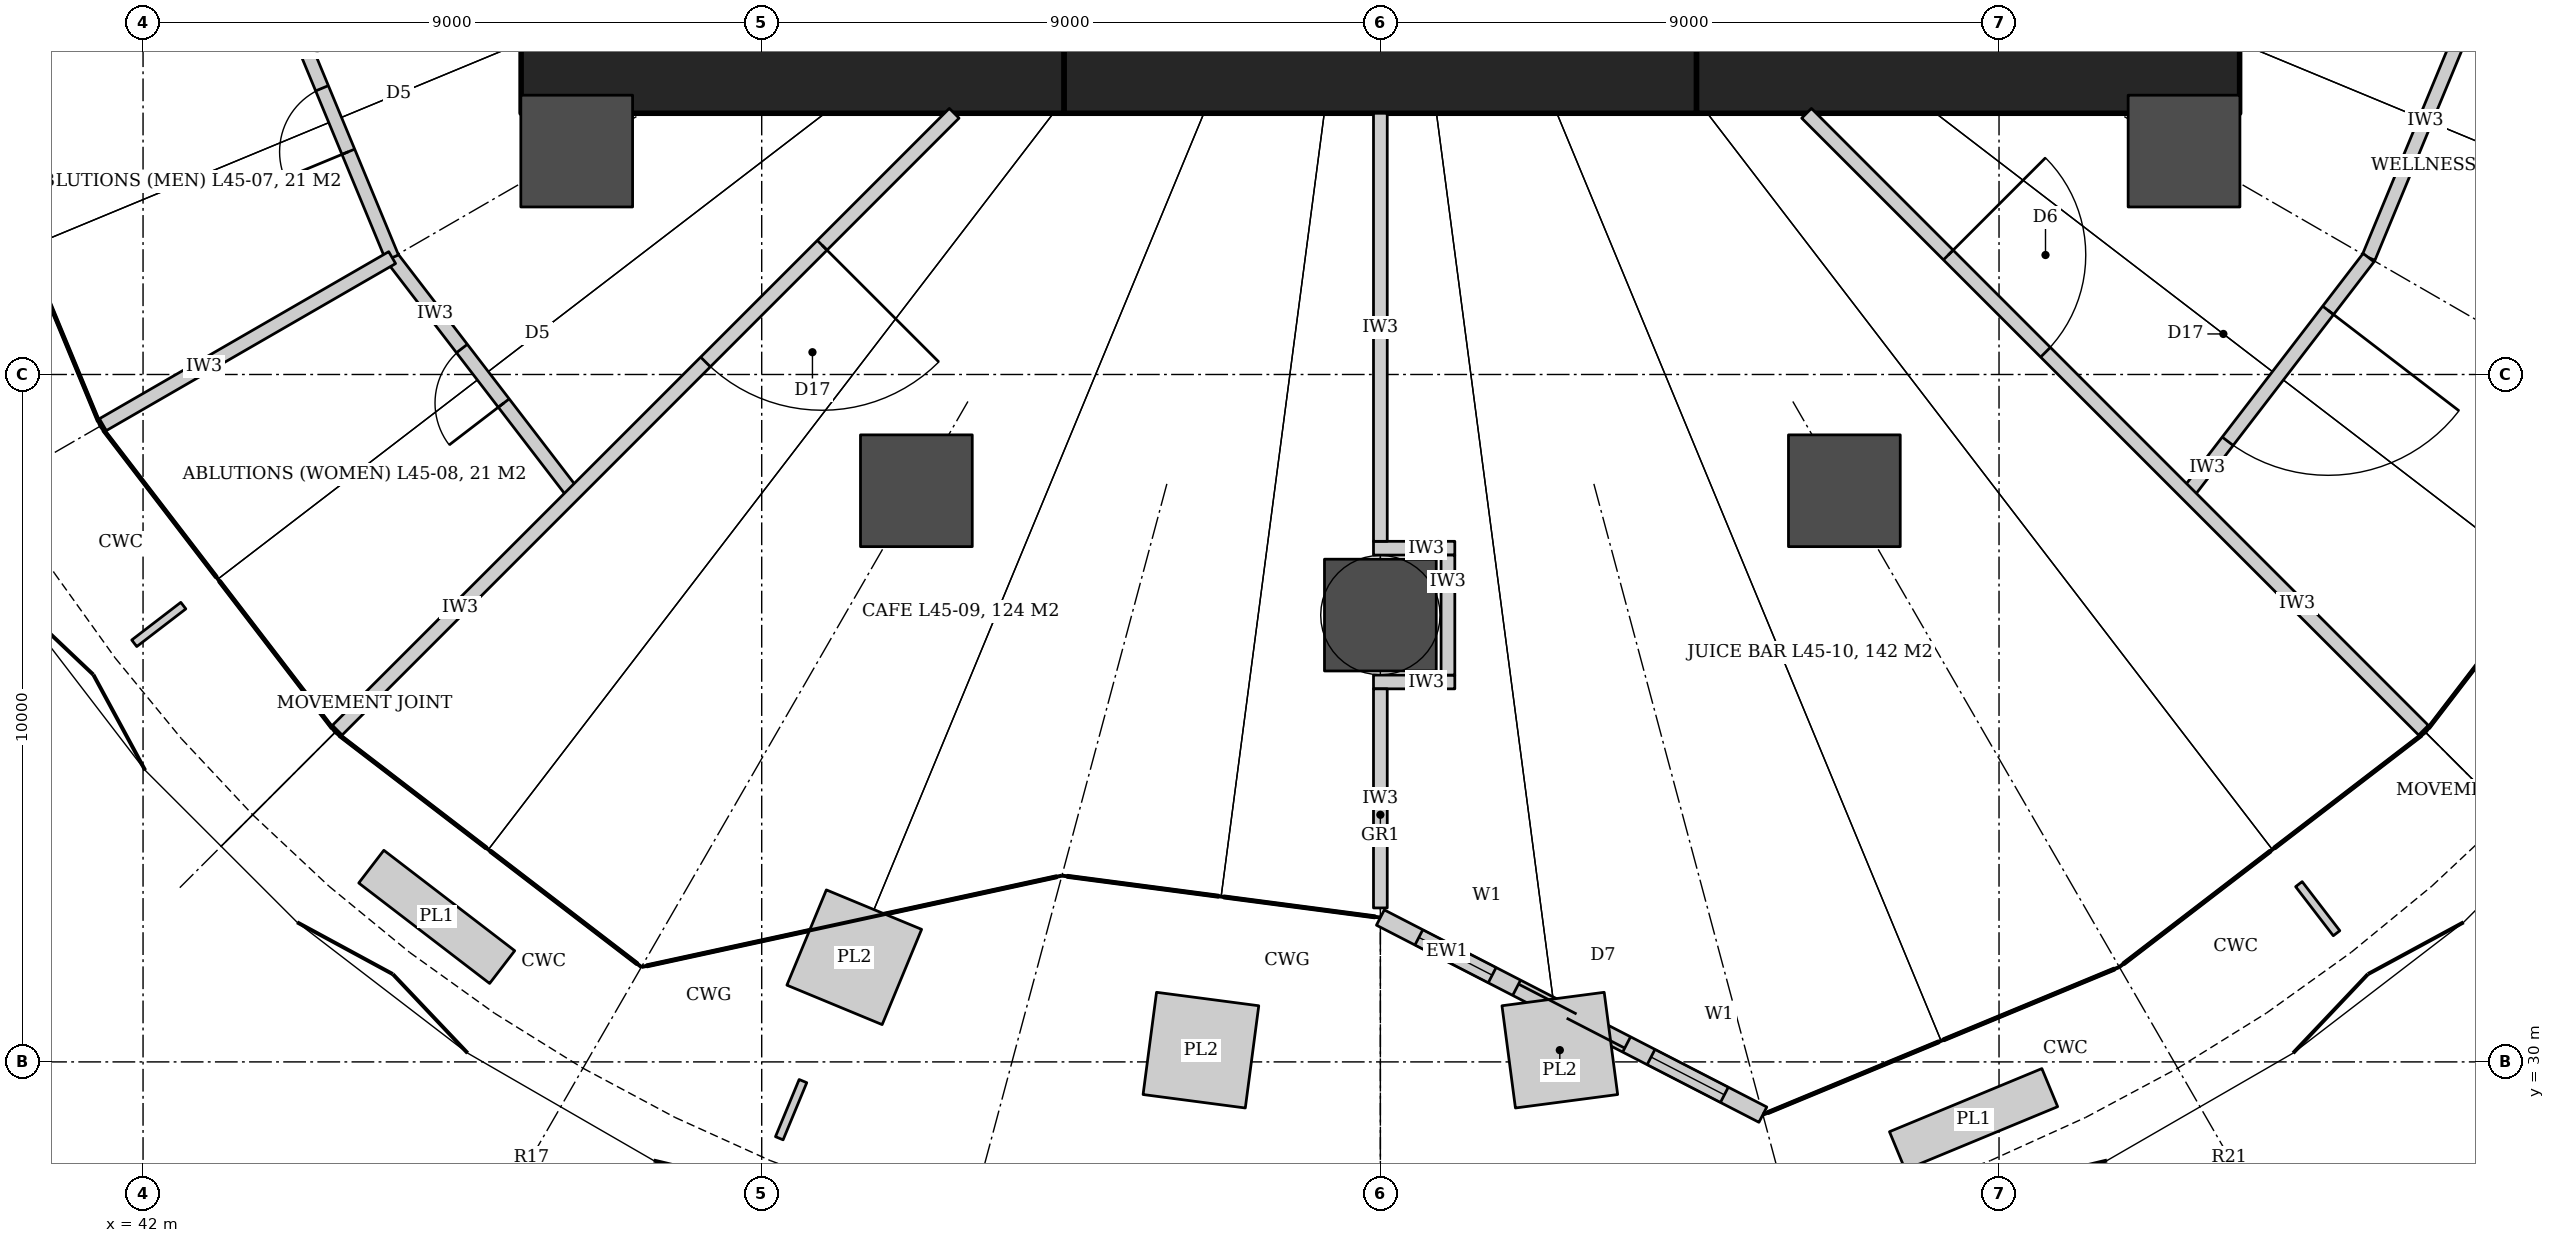
"""IFC4 building model, lengths in metres.
Left out: names, types, materials, properties, quantities, classifications, styles, units other than length and angle.
Written with IfcOpenShell. Run it as: python <this file> out.ifc"""

import sys

from ifc_helpers import new_model, si_unit, direction, frame, frame_2d, origin, origin_2d, place, context, subcontext, project, spatial, rectangle, hollow_circle, extrude, element, fill, save


model = new_model("IFC4")
c1 = context("Model", 3, precision=1e-05, world=origin(), true_north=direction((0.0, 1.0)))
c2 = subcontext(c1, "Body", "Model", "MODEL_VIEW")
j1 = project(units=[si_unit("LENGTHUNIT", "METRE"), si_unit("PLANEANGLEUNIT", "RADIAN")], contexts=[c1])
p1 = place(None, origin())
s1 = spatial("IfcSite", under=j1, at=p1, CompositionType="ELEMENT")
p2 = place(p1, origin())
s2 = spatial("IfcBuilding", under=s1, at=p2, CompositionType="ELEMENT")
p3 = place(p2, frame((0.0, 0.0, 198.2)))
s3 = spatial("IfcBuildingStorey", under=s2, at=p3, CompositionType="ELEMENT", Elevation=198.2)
p4 = place(p3, frame((47.5, 44.55, 0.0), z_axis=(0.0, 0.0, 1.0), x_axis=(1.0, 0.0, 0.0)))
e1 = element("IfcWall", 1, at=p4, inside=s3, PredefinedType="SHEAR", context=c2, shape_type="SweptSolid", body=[
    extrude(rectangle(XDim=7.9, YDim=1.5, at=frame_2d((3.95, 0.0))), origin(), (0.0, 0.0, 1.0), 4.2),
])
p5 = place(p3, frame((55.4, 44.55, 0.0), z_axis=(0.0, 0.0, 1.0), x_axis=(1.0, 0.0, 0.0)))
e2 = element("IfcWall", 2, at=p5, inside=s3, PredefinedType="SHEAR", context=c2, shape_type="SweptSolid", body=[
    extrude(rectangle(XDim=9.2, YDim=1.5, at=frame_2d((4.6, 0.0))), origin(), (0.0, 0.0, 1.0), 4.2),
])
p6 = place(p3, frame((64.6, 44.55, 0.0), z_axis=(0.0, 0.0, 1.0), x_axis=(1.0, 0.0, 0.0)))
e3 = element("IfcWall", 3, at=p6, inside=s3, PredefinedType="SHEAR", context=c2, shape_type="SweptSolid", body=[
    extrude(rectangle(XDim=7.9, YDim=1.5, at=frame_2d((3.95, 0.0))), origin(), (0.0, 0.0, 1.0), 4.2),
])
for number, where, z_axis, x_axis in (
    (4, (48.309, 43.25, 0.0), (0.0, 0.0, 1.0), (1.0, 0.0, 0.0)),
    (5, (53.25, 38.309, 0.0), (0.0, 0.0, 1.0), (1.0, 0.0, 0.0)),
    (6, (60.0, 36.5, 0.0), (0.0, 0.0, 1.0), (1.0, 0.0, 0.0)),
    (7, (66.75, 38.309, 0.0), (0.0, 0.0, 1.0), (1.0, 0.0, 0.0)),
    (8, (71.691, 43.25, 0.0), (0.0, 0.0, 1.0), (1.0, 0.0, 0.0)),
):
    element("IfcColumn", number, at=place(p3, frame(where, z_axis=z_axis, x_axis=x_axis)), inside=s3, PredefinedType="COLUMN", context=c2, shape_type="SweptSolid", body=[
        extrude(hollow_circle(Radius=0.813, WallThickness=0.08, at=origin_2d()), origin(), (0.0, 0.0, 1.0), 4.2),
    ])
p7 = place(p3, frame((48.262, 38.262, 0.0), z_axis=(0.0, 0.0, 1.0), x_axis=(-0.60874374674, 0.79336690806, 0.0)))
e9 = element("IfcWall", 9, at=p7, inside=s3, PredefinedType="PARTITIONING", context=c2, shape_type="SweptSolid", body=[
    extrude(rectangle(XDim=4.333, YDim=0.2, at=frame_2d((2.167, 0.0))), origin(), (0.0, 0.0, 1.0), 3.012),
])
p8 = place(p7, frame((1.667, 0.0, 0.0)))
e10 = element("IfcOpeningElement", 10, at=p8, cuts=e9, PredefinedType="OPENING", context=c2, shape_type="SweptSolid", body=[
    extrude(rectangle(XDim=1.0, YDim=2.1, at=frame_2d((0.5, 1.05))), frame((0.0, 0.11, 0.0), z_axis=(0.0, -1.0, 0.0), x_axis=(1.0, 0.0, 0.0)), (0.0, 0.0, 1.0), 0.22),
])
p9 = place(p3, frame((45.624, 41.7, 0.0), z_axis=(0.0, 0.0, 1.0), x_axis=(-0.382698425325, 0.923873322082, 0.0)))
e11 = element("IfcWall", 11, at=p9, inside=s3, PredefinedType="PARTITIONING", context=c2, shape_type="SweptSolid", body=[
    extrude(rectangle(XDim=4.333, YDim=0.2, at=frame_2d((2.167, 0.0))), origin(), (0.0, 0.0, 1.0), 3.012),
])
p10 = place(p9, frame((1.667, 0.0, 0.0)))
e12 = element("IfcOpeningElement", 12, at=p10, cuts=e11, PredefinedType="OPENING", context=c2, shape_type="SweptSolid", body=[
    extrude(rectangle(XDim=1.0, YDim=2.1, at=frame_2d((0.5, 1.05))), frame((0.0, 0.11, 0.0), z_axis=(0.0, -1.0, 0.0), x_axis=(1.0, 0.0, 0.0)), (0.0, 0.0, 1.0), 0.22),
])
p11 = place(p3, frame((76.034, 45.704, 0.0), z_axis=(0.0, 0.0, 1.0), x_axis=(-0.382698425325, -0.923873322082, 0.0)))
e13 = element("IfcWall", 13, at=p11, inside=s3, PredefinedType="PARTITIONING", context=c2, shape_type="SweptSolid", body=[
    extrude(rectangle(XDim=4.333, YDim=0.2, at=frame_2d((2.167, 0.0))), origin(), (0.0, 0.0, 1.0), 3.012),
])
p12 = place(p3, frame((74.376, 41.7, 0.0), z_axis=(0.0, 0.0, 1.0), x_axis=(-0.60874374674, -0.79336690806, 0.0)))
e14 = element("IfcWall", 14, at=p12, inside=s3, PredefinedType="PARTITIONING", context=c2, shape_type="SweptSolid", body=[
    extrude(rectangle(XDim=4.333, YDim=0.2, at=frame_2d((2.167, 0.0))), origin(), (0.0, 0.0, 1.0), 3.012),
])
p13 = place(p12, frame((0.967, 0.0, 0.0)))
e15 = element("IfcOpeningElement", 15, at=p13, cuts=e14, PredefinedType="OPENING", context=c2, shape_type="SweptSolid", body=[
    extrude(rectangle(XDim=2.4, YDim=2.4, at=frame_2d((1.2, 1.2))), frame((0.0, 0.11, 0.0), z_axis=(0.0, -1.0, 0.0), x_axis=(1.0, 0.0, 0.0)), (0.0, 0.0, 1.0), 0.22),
])
p14 = place(p3, frame((43.966, 45.704, 0.0), z_axis=(0.0, 0.0, 1.0), x_axis=(-0.965926072385, -0.25881812666, 0.0)))
e16 = element("IfcWall", 16, at=p14, inside=s3, PredefinedType="PARTITIONING", context=c2, shape_type="SweptSolid", body=[
    extrude(rectangle(XDim=4.76, YDim=0.125, at=frame_2d((2.38, 0.0))), origin(), (0.0, 0.0, 1.0), 3.04),
])
p15 = place(p3, frame((45.624, 41.7, 0.0), z_axis=(0.0, 0.0, 1.0), x_axis=(-0.866036685051, -0.499980459763, 0.0)))
e17 = element("IfcWall", 17, at=p15, inside=s3, PredefinedType="PARTITIONING", context=c2, shape_type="SweptSolid", body=[
    extrude(rectangle(XDim=4.86, YDim=0.2, at=frame_2d((2.43, 0.0))), origin(), (0.0, 0.0, 1.0), 3.04),
])
p16 = place(p3, frame((53.8, 43.8, 0.0), z_axis=(0.0, 0.0, 1.0), x_axis=(-0.707106781187, -0.707106781187, 0.0)))
e18 = element("IfcWall", 18, at=p16, inside=s3, PredefinedType="PARTITIONING", context=c2, shape_type="SweptSolid", body=[
    extrude(rectangle(XDim=12.692, YDim=0.2, at=frame_2d((6.346, 0.0))), origin(), (0.0, 0.0, 1.0), 3.02),
])
p17 = place(p16, frame((2.716, 0.0, 0.0)))
e19 = element("IfcOpeningElement", 19, at=p17, cuts=e18, PredefinedType="OPENING", context=c2, shape_type="SweptSolid", body=[
    extrude(rectangle(XDim=2.4, YDim=2.4, at=frame_2d((1.2, 1.2))), frame((0.0, 0.11, 0.0), z_axis=(0.0, -1.0, 0.0), x_axis=(1.0, 0.0, 0.0)), (0.0, 0.0, 1.0), 0.22),
])
for number, where, z_axis, x_axis in (
    (20, (59.9, 37.473, 0.0), (0.0, 0.0, 1.0), (1.0, 0.0, 0.0)),
    (21, (59.9, 35.527, 0.0), (0.0, 0.0, 1.0), (1.0, 0.0, 0.0)),
):
    element("IfcWall", number, at=place(p3, frame(where, z_axis=z_axis, x_axis=x_axis)), inside=s3, PredefinedType="PARTITIONING", context=c2, shape_type="SweptSolid", body=[
        extrude(rectangle(XDim=1.183, YDim=0.2, at=frame_2d((0.592, 0.0))), origin(), (0.0, 0.0, 1.0), 3.02),
    ])
p18 = place(p3, frame((60.983, 37.373, 0.0), z_axis=(0.0, 0.0, 1.0), x_axis=(0.0, -1.0, 0.0)))
e22 = element("IfcWall", 22, at=p18, inside=s3, PredefinedType="PARTITIONING", context=c2, shape_type="SweptSolid", body=[
    extrude(rectangle(XDim=1.746, YDim=0.2, at=frame_2d((0.873, 0.0))), origin(), (0.0, 0.0, 1.0), 3.02),
])
p19 = place(p3, frame((60.0, 43.8, 0.0), z_axis=(0.0, 0.0, 1.0), x_axis=(0.0, -1.0, 0.0)))
e23 = element("IfcWall", 23, at=p19, inside=s3, PredefinedType="PARTITIONING", context=c2, shape_type="SweptSolid", body=[
    extrude(rectangle(XDim=6.227, YDim=0.2, at=frame_2d((3.114, 0.0))), origin(), (0.0, 0.0, 1.0), 3.04),
])
p20 = place(p3, frame((60.0, 35.427, 0.0), z_axis=(0.0, 0.0, 1.0), x_axis=(0.0, -1.0, 0.0)))
e24 = element("IfcWall", 24, at=p20, inside=s3, PredefinedType="PARTITIONING", context=c2, shape_type="SweptSolid", body=[
    extrude(rectangle(XDim=3.187, YDim=0.2, at=frame_2d((1.594, 0.0))), origin(), (0.0, 0.0, 1.0), 3.04),
])
p21 = place(p3, frame((66.2, 43.8, 0.0), z_axis=(0.0, 0.0, 1.0), x_axis=(0.707106781187, -0.707106781187, 0.0)))
e25 = element("IfcWall", 25, at=p21, inside=s3, PredefinedType="PARTITIONING", context=c2, shape_type="SweptSolid", body=[
    extrude(rectangle(XDim=12.692, YDim=0.2, at=frame_2d((6.346, 0.0))), origin(), (0.0, 0.0, 1.0), 3.02),
])
p22 = place(p21, frame((2.916, 0.0, 0.0)))
e26 = element("IfcOpeningElement", 26, at=p22, cuts=e25, PredefinedType="OPENING", context=c2, shape_type="SweptSolid", body=[
    extrude(rectangle(XDim=2.0, YDim=2.1, at=frame_2d((1.0, 1.05))), frame((0.0, 0.11, 0.0), z_axis=(0.0, -1.0, 0.0), x_axis=(1.0, 0.0, 0.0)), (0.0, 0.0, 1.0), 0.22),
])
p23 = place(p3, frame((60.0, 32.1, 0.0), z_axis=(0.0, 0.0, 1.0), x_axis=(0.888924513524, -0.458053718744, 0.0)))
e27 = element("IfcWall", 27, at=p23, inside=s3, PredefinedType="SOLIDWALL", context=c2, shape_type="SweptSolid", body=[
    extrude(rectangle(XDim=6.26, YDim=0.25, at=frame_2d((3.13, 0.0))), origin(), (0.0, 0.0, 1.0), 4.04),
])
p24 = place(p23, frame((2.23, 0.0, 0.0)))
e28 = element("IfcOpeningElement", 28, at=p24, cuts=e27, PredefinedType="OPENING", context=c2, shape_type="SweptSolid", body=[
    extrude(rectangle(XDim=1.8, YDim=2.4, at=frame_2d((0.9, 1.2))), frame((0.0, 0.135, 0.0), z_axis=(0.0, -1.0, 0.0), x_axis=(1.0, 0.0, 0.0)), (0.0, 0.0, 1.0), 0.27),
])
p25 = place(p23, frame((0.63, 0.0, 0.0)))
e29 = element("IfcOpeningElement", 29, at=p25, cuts=e27, PredefinedType="OPENING", context=c2, shape_type="SweptSolid", body=[
    extrude(rectangle(XDim=1.2, YDim=2.4, at=frame_2d((0.6, 1.2))), frame((0.0, 0.135, 0.0), z_axis=(0.0, -1.0, 0.0), x_axis=(1.0, 0.0, 0.0)), (0.0, 0.0, 1.0), 0.27),
])
p26 = place(p23, frame((4.43, 0.0, 0.0)))
e30 = element("IfcOpeningElement", 30, at=p26, cuts=e27, PredefinedType="OPENING", context=c2, shape_type="SweptSolid", body=[
    extrude(rectangle(XDim=1.2, YDim=2.4, at=frame_2d((0.6, 1.2))), frame((0.0, 0.135, 0.0), z_axis=(0.0, -1.0, 0.0), x_axis=(1.0, 0.0, 0.0)), (0.0, 0.0, 1.0), 0.27),
])
p27 = place(p10, origin())
e31 = element("IfcDoor", 31, at=p27, inside=s3, OperationType="SINGLE_SWING_LEFT", PredefinedType="DOOR", context=c2, shape_type="SweptSolid", body=[
    extrude(rectangle(XDim=1.0, YDim=2.1, at=frame_2d((0.5, 1.05))), frame((0.0, 0.025, 0.0), z_axis=(0.0, -1.0, 0.0), x_axis=(1.0, 0.0, 0.0)), (0.0, 0.0, 1.0), 0.05),
])
fill(e12, e31)
p28 = place(p8, origin())
e32 = element("IfcDoor", 32, at=p28, inside=s3, OperationType="SINGLE_SWING_LEFT", PredefinedType="DOOR", context=c2, shape_type="SweptSolid", body=[
    extrude(rectangle(XDim=1.0, YDim=2.1, at=frame_2d((0.5, 1.05))), frame((0.0, 0.025, 0.0), z_axis=(0.0, -1.0, 0.0), x_axis=(1.0, 0.0, 0.0)), (0.0, 0.0, 1.0), 0.05),
])
fill(e10, e32)
p29 = place(p17, origin())
e33 = element("IfcDoor", 33, at=p29, inside=s3, OperationType="DOUBLE_DOOR_DOUBLE_SWING", PredefinedType="DOOR", context=c2, shape_type="SweptSolid", body=[
    extrude(rectangle(XDim=2.4, YDim=2.4, at=frame_2d((1.2, 1.2))), frame((0.0, 0.025, 0.0), z_axis=(0.0, -1.0, 0.0), x_axis=(1.0, 0.0, 0.0)), (0.0, 0.0, 1.0), 0.05),
])
fill(e19, e33)
p30 = place(p22, origin())
e34 = element("IfcDoor", 34, at=p30, inside=s3, OperationType="DOUBLE_DOOR_DOUBLE_SWING", PredefinedType="DOOR", context=c2, shape_type="SweptSolid", body=[
    extrude(rectangle(XDim=2.0, YDim=2.1, at=frame_2d((1.0, 1.05))), frame((0.0, 0.025, 0.0), z_axis=(0.0, -1.0, 0.0), x_axis=(1.0, 0.0, 0.0)), (0.0, 0.0, 1.0), 0.05),
])
fill(e26, e34)
p31 = place(p13, origin())
e35 = element("IfcDoor", 35, at=p31, inside=s3, OperationType="DOUBLE_DOOR_DOUBLE_SWING", PredefinedType="DOOR", context=c2, shape_type="SweptSolid", body=[
    extrude(rectangle(XDim=2.4, YDim=2.4, at=frame_2d((1.2, 1.2))), frame((0.0, 0.025, 0.0), z_axis=(0.0, -1.0, 0.0), x_axis=(1.0, 0.0, 0.0)), (0.0, 0.0, 1.0), 0.05),
])
fill(e15, e35)
p32 = place(p24, origin())
e36 = element("IfcDoor", 36, at=p32, inside=s3, OperationType="DOUBLE_DOOR_SLIDING", PredefinedType="DOOR", context=c2, shape_type="SweptSolid", body=[
    extrude(rectangle(XDim=1.8, YDim=2.4, at=frame_2d((0.9, 1.2))), frame((0.0, 0.025, 0.0), z_axis=(0.0, -1.0, 0.0), x_axis=(1.0, 0.0, 0.0)), (0.0, 0.0, 1.0), 0.05),
])
fill(e28, e36)
p33 = place(p25, origin())
e37 = element("IfcWindow", 37, at=p33, inside=s3, PartitioningType="SINGLE_PANEL", PredefinedType="WINDOW", context=c2, shape_type="SweptSolid", body=[
    extrude(rectangle(XDim=1.2, YDim=2.4, at=frame_2d((0.6, 1.2))), frame((0.0, 0.03, 0.0), z_axis=(0.0, -1.0, 0.0), x_axis=(1.0, 0.0, 0.0)), (0.0, 0.0, 1.0), 0.06),
])
fill(e29, e37)
p34 = place(p26, origin())
e38 = element("IfcWindow", 38, at=p34, inside=s3, PartitioningType="SINGLE_PANEL", PredefinedType="WINDOW", context=c2, shape_type="SweptSolid", body=[
    extrude(rectangle(XDim=1.2, YDim=2.4, at=frame_2d((0.6, 1.2))), frame((0.0, 0.03, 0.0), z_axis=(0.0, -1.0, 0.0), x_axis=(1.0, 0.0, 0.0)), (0.0, 0.0, 1.0), 0.06),
])
fill(e30, e38)
save(model, sys.argv[1])
